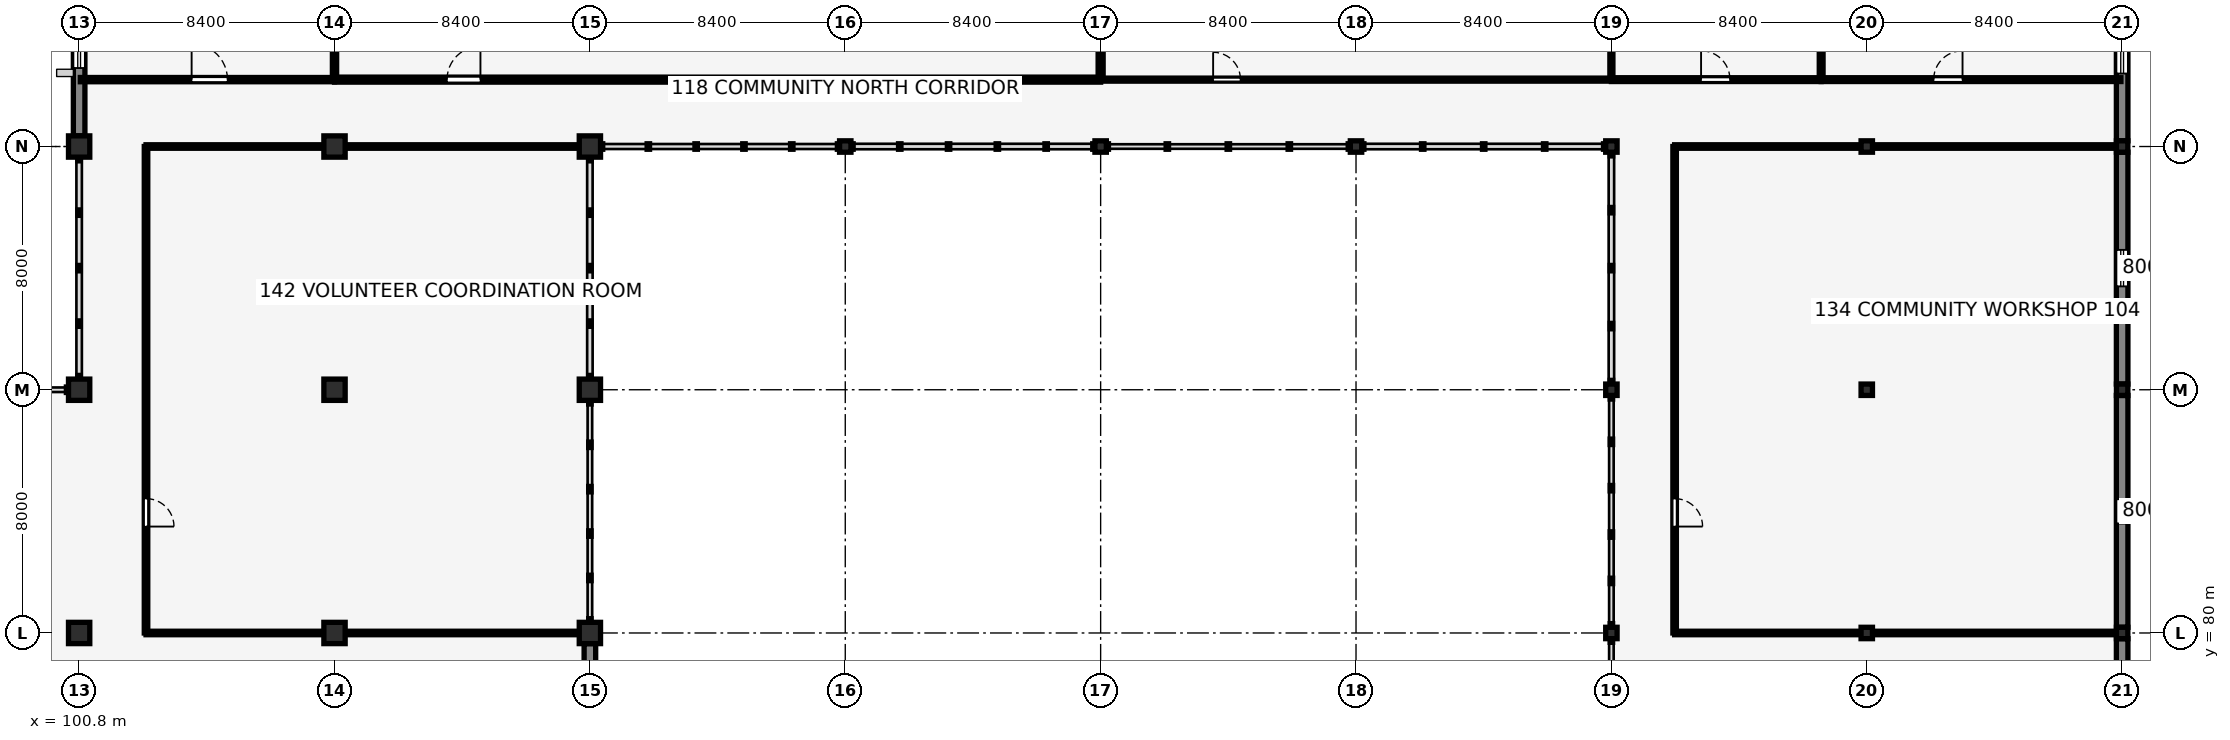
"""IFC4 building model, lengths in metres.
Left out: names, types, materials, properties, quantities, classifications, styles, units other than length and angle.
Written with IfcOpenShell. Run it as: python <this file> out.ifc"""

import sys

from ifc_helpers import new_model, si_unit, direction, frame, frame_2d, origin, origin_2d, place, context, subcontext, project, spatial, rectangle, i_section, extrude, element, fill, save


model = new_model("IFC4")
c1 = context("Model", 3, precision=1e-05, world=origin(), true_north=direction((0.0, 1.0)))
c2 = subcontext(c1, "Body", "Model", "MODEL_VIEW")
j1 = project(units=[si_unit("LENGTHUNIT", "METRE"), si_unit("PLANEANGLEUNIT", "RADIAN")], contexts=[c1])
p1 = place(None, origin())
s1 = spatial("IfcSite", under=j1, at=p1, CompositionType="ELEMENT")
p2 = place(p1, origin())
s2 = spatial("IfcBuilding", under=s1, at=p2, CompositionType="ELEMENT")
p3 = place(p2, frame((0.0, 0.0, 5.44)))
s3 = spatial("IfcBuildingStorey", under=s2, at=p3, CompositionType="ELEMENT", Elevation=5.44)
for number, where, z_axis, x_axis in (
    (1, (100.8, 80.0, 0.0), (0.0, 0.0, 1.0), (1.0, 0.0, 0.0)),
    (2, (100.8, 88.0, 0.0), (0.0, 0.0, 1.0), (1.0, 0.0, 0.0)),
    (3, (100.8, 96.0, 0.0), (0.0, 0.0, 1.0), (1.0, 0.0, 0.0)),
    (4, (109.2, 80.0, 0.0), (0.0, 0.0, 1.0), (1.0, 0.0, 0.0)),
    (5, (109.2, 88.0, 0.0), (0.0, 0.0, 1.0), (1.0, 0.0, 0.0)),
    (6, (109.2, 96.0, 0.0), (0.0, 0.0, 1.0), (1.0, 0.0, 0.0)),
    (7, (117.6, 80.0, 0.0), (0.0, 0.0, 1.0), (1.0, 0.0, 0.0)),
    (8, (117.6, 88.0, 0.0), (0.0, 0.0, 1.0), (1.0, 0.0, 0.0)),
    (9, (117.6, 96.0, 0.0), (0.0, 0.0, 1.0), (1.0, 0.0, 0.0)),
):
    element("IfcColumn", number, at=place(p3, frame(where, z_axis=z_axis, x_axis=x_axis)), inside=s3, PredefinedType="COLUMN", context=c2, shape_type="SweptSolid", body=[
        extrude(rectangle(XDim=0.7, YDim=0.7, at=origin_2d()), origin(), (0.0, 0.0, 1.0), 3.8),
    ])
for number, where, z_axis, x_axis in (
    (10, (126.0, 96.0, 0.0), (0.0, 0.0, 1.0), (1.0, 0.0, 0.0)),
    (11, (134.4, 96.0, 0.0), (0.0, 0.0, 1.0), (1.0, 0.0, 0.0)),
    (12, (142.8, 96.0, 0.0), (0.0, 0.0, 1.0), (1.0, 0.0, 0.0)),
    (13, (151.2, 80.0, 0.0), (0.0, 0.0, 1.0), (1.0, 0.0, 0.0)),
    (14, (151.2, 88.0, 0.0), (0.0, 0.0, 1.0), (1.0, 0.0, 0.0)),
    (15, (151.2, 96.0, 0.0), (0.0, 0.0, 1.0), (1.0, 0.0, 0.0)),
    (16, (159.6, 80.0, 0.0), (0.0, 0.0, 1.0), (1.0, 0.0, 0.0)),
    (17, (159.6, 88.0, 0.0), (0.0, 0.0, 1.0), (1.0, 0.0, 0.0)),
    (18, (159.6, 96.0, 0.0), (0.0, 0.0, 1.0), (1.0, 0.0, 0.0)),
    (19, (168.0, 80.0, 0.0), (0.0, 0.0, 1.0), (1.0, 0.0, 0.0)),
    (20, (168.0, 88.0, 0.0), (0.0, 0.0, 1.0), (1.0, 0.0, 0.0)),
    (21, (168.0, 96.0, 0.0), (0.0, 0.0, 1.0), (1.0, 0.0, 0.0)),
):
    element("IfcColumn", number, at=place(p3, frame(where, z_axis=z_axis, x_axis=x_axis)), inside=s3, PredefinedType="COLUMN", context=c2, shape_type="SweptSolid", body=[
        extrude(i_section(OverallWidth=0.375, OverallDepth=0.375, WebThickness=0.017, FlangeThickness=0.027, FilletRadius=0.015, at=origin_2d()), origin(), (0.0, 0.0, 1.0), 3.8),
    ])
p4 = place(p3, frame((100.8, 96.35, 0.0), z_axis=(0.0, 0.0, 1.0), x_axis=(0.0, 1.0, 0.0)))
e22 = element("IfcWall", 22, at=p4, inside=s3, PredefinedType="SOLIDWALL", context=c2, shape_type="SweptSolid", body=[
    extrude(rectangle(XDim=7.463, YDim=0.38, at=frame_2d((3.731, 0.0))), origin(), (0.0, 0.0, 1.0), 3.442),
])
p5 = place(p4, frame((2.231, 0.0, 0.9), z_axis=(0.0, 0.0, 1.0), x_axis=(1.0, 0.0, 0.0)))
e23 = element("IfcOpeningElement", 23, at=p5, cuts=e22, PredefinedType="OPENING", context=c2, shape_type="SweptSolid", body=[
    extrude(rectangle(XDim=3.0, YDim=1.65, at=frame_2d((1.5, 0.825))), frame((0.0, 0.2, 0.0), z_axis=(0.0, -1.0, 0.0), x_axis=(1.0, 0.0, 0.0)), (0.0, 0.0, 1.0), 0.4),
])
p6 = place(p3, frame((168.0, 96.187, 0.0), z_axis=(0.0, 0.0, 1.0), x_axis=(0.0, 1.0, 0.0)))
e24 = element("IfcWall", 24, at=p6, inside=s3, PredefinedType="SOLIDWALL", context=c2, shape_type="SweptSolid", body=[
    extrude(rectangle(XDim=7.625, YDim=0.38, at=frame_2d((3.813, 0.0))), origin(), (0.0, 0.0, 1.0), 3.442),
])
p7 = place(p6, frame((2.213, 0.0, 1.55), z_axis=(0.0, 0.0, 1.0), x_axis=(1.0, 0.0, 0.0)))
e25 = element("IfcOpeningElement", 25, at=p7, cuts=e24, PredefinedType="OPENING", context=c2, shape_type="SweptSolid", body=[
    extrude(rectangle(XDim=3.2, YDim=0.9, at=frame_2d((1.6, 0.45))), frame((0.0, 0.2, 0.0), z_axis=(0.0, -1.0, 0.0), x_axis=(1.0, 0.0, 0.0)), (0.0, 0.0, 1.0), 0.4),
])
p8 = place(p3, frame((168.0, 72.187, 0.0), z_axis=(0.0, 0.0, 1.0), x_axis=(0.0, 1.0, 0.0)))
e26 = element("IfcWall", 26, at=p8, inside=s3, PredefinedType="SOLIDWALL", context=c2, shape_type="SweptSolid", body=[
    extrude(rectangle(XDim=7.625, YDim=0.38, at=frame_2d((3.813, 0.0))), origin(), (0.0, 0.0, 1.0), 3.5),
])
p9 = place(p3, frame((168.0, 80.187, 0.0), z_axis=(0.0, 0.0, 1.0), x_axis=(0.0, 1.0, 0.0)))
e27 = element("IfcWall", 27, at=p9, inside=s3, PredefinedType="SOLIDWALL", context=c2, shape_type="SweptSolid", body=[
    extrude(rectangle(XDim=7.625, YDim=0.38, at=frame_2d((3.813, 0.0))), origin(), (0.0, 0.0, 1.0), 3.442),
])
p10 = place(p9, frame((3.413, 0.0, 0.65), z_axis=(0.0, 0.0, 1.0), x_axis=(1.0, 0.0, 0.0)))
e28 = element("IfcOpeningElement", 28, at=p10, cuts=e27, PredefinedType="OPENING", context=c2, shape_type="SweptSolid", body=[
    extrude(rectangle(XDim=0.8, YDim=1.85, at=frame_2d((0.4, 0.925))), frame((0.0, 0.2, 0.0), z_axis=(0.0, -1.0, 0.0), x_axis=(1.0, 0.0, 0.0)), (0.0, 0.0, 1.0), 0.4),
])
p11 = place(p3, frame((168.0, 88.187, 0.0), z_axis=(0.0, 0.0, 1.0), x_axis=(0.0, 1.0, 0.0)))
e29 = element("IfcWall", 29, at=p11, inside=s3, PredefinedType="SOLIDWALL", context=c2, shape_type="SweptSolid", body=[
    extrude(rectangle(XDim=7.625, YDim=0.38, at=frame_2d((3.813, 0.0))), origin(), (0.0, 0.0, 1.0), 3.442),
])
p12 = place(p11, frame((3.213, 0.0, 1.55), z_axis=(0.0, 0.0, 1.0), x_axis=(1.0, 0.0, 0.0)))
e30 = element("IfcOpeningElement", 30, at=p12, cuts=e29, PredefinedType="OPENING", context=c2, shape_type="SweptSolid", body=[
    extrude(rectangle(XDim=1.2, YDim=0.95, at=frame_2d((0.6, 0.475))), frame((0.0, 0.2, 0.0), z_axis=(0.0, -1.0, 0.0), x_axis=(1.0, 0.0, 0.0)), (0.0, 0.0, 1.0), 0.4),
])
p13 = place(p3, frame((117.6, 72.35, 0.0), z_axis=(0.0, 0.0, 1.0), x_axis=(0.0, 1.0, 0.0)))
e31 = element("IfcWall", 31, at=p13, inside=s3, PredefinedType="SOLIDWALL", context=c2, shape_type="SweptSolid", body=[
    extrude(rectangle(XDim=7.3, YDim=0.38, at=frame_2d((3.65, 0.0))), origin(), (0.0, 0.0, 1.0), 3.5),
])
p14 = place(p3, frame((100.84, 98.2, 0.0), z_axis=(0.0, 0.0, 1.0), x_axis=(1.0, 0.0, 0.0)))
e32 = element("IfcWall", 32, at=p14, inside=s3, PredefinedType="PARTITIONING", context=c2, shape_type="SweptSolid", body=[
    extrude(rectangle(XDim=8.36, YDim=0.14, at=frame_2d((4.18, 0.0))), origin(), (0.0, 0.0, 1.0), 3.8),
])
p15 = place(p14, frame((3.66, 0.0, 0.0), z_axis=(0.0, 0.0, 1.0), x_axis=(1.0, 0.0, 0.0)))
e33 = element("IfcOpeningElement", 33, at=p15, cuts=e32, PredefinedType="OPENING", context=c2, shape_type="SweptSolid", body=[
    extrude(rectangle(XDim=1.18, YDim=2.22, at=frame_2d((0.59, 1.11))), frame((0.0, 0.08, 0.0), z_axis=(0.0, -1.0, 0.0), x_axis=(1.0, 0.0, 0.0)), (0.0, 0.0, 1.0), 0.16),
])
p16 = place(p3, frame((109.2, 98.2, 0.0), z_axis=(0.0, 0.0, 1.0), x_axis=(1.0, 0.0, 0.0)))
e34 = element("IfcWall", 34, at=p16, inside=s3, PredefinedType="PARTITIONING", context=c2, shape_type="SweptSolid", body=[
    extrude(rectangle(XDim=25.2, YDim=0.165, at=frame_2d((12.6, 0.0))), origin(), (0.0, 0.0, 1.0), 3.8),
])
p17 = place(p16, frame((3.7, 0.0, 0.0), z_axis=(0.0, 0.0, 1.0), x_axis=(1.0, 0.0, 0.0)))
e35 = element("IfcOpeningElement", 35, at=p17, cuts=e34, PredefinedType="OPENING", context=c2, shape_type="SweptSolid", body=[
    extrude(rectangle(XDim=1.1, YDim=2.2, at=frame_2d((0.55, 1.1))), frame((0.0, 0.093, 0.0), z_axis=(0.0, -1.0, 0.0), x_axis=(1.0, 0.0, 0.0)), (0.0, 0.0, 1.0), 0.185),
])
p18 = place(p3, frame((134.4, 98.2, 0.0), z_axis=(0.0, 0.0, 1.0), x_axis=(1.0, 0.0, 0.0)))
e36 = element("IfcWall", 36, at=p18, inside=s3, PredefinedType="PARTITIONING", context=c2, shape_type="SweptSolid", body=[
    extrude(rectangle(XDim=16.8, YDim=0.1, at=frame_2d((8.4, 0.0))), origin(), (0.0, 0.0, 1.0), 3.337),
])
p19 = place(p18, frame((3.7, 0.0, 0.0), z_axis=(0.0, 0.0, 1.0), x_axis=(1.0, 0.0, 0.0)))
e37 = element("IfcOpeningElement", 37, at=p19, cuts=e36, PredefinedType="OPENING", context=c2, shape_type="SweptSolid", body=[
    extrude(rectangle(XDim=0.9, YDim=2.1, at=frame_2d((0.45, 1.05))), frame((0.0, 0.06, 0.0), z_axis=(0.0, -1.0, 0.0), x_axis=(1.0, 0.0, 0.0)), (0.0, 0.0, 1.0), 0.12),
])
p20 = place(p3, frame((151.2, 98.2, 0.0), z_axis=(0.0, 0.0, 1.0), x_axis=(1.0, 0.0, 0.0)))
e38 = element("IfcWall", 38, at=p20, inside=s3, PredefinedType="PARTITIONING", context=c2, shape_type="SweptSolid", body=[
    extrude(rectangle(XDim=6.9, YDim=0.125, at=frame_2d((3.45, 0.0))), origin(), (0.0, 0.0, 1.0), 3.8),
])
p21 = place(p20, frame((2.95, 0.0, 0.0), z_axis=(0.0, 0.0, 1.0), x_axis=(1.0, 0.0, 0.0)))
e39 = element("IfcOpeningElement", 39, at=p21, cuts=e38, PredefinedType="OPENING", context=c2, shape_type="SweptSolid", body=[
    extrude(rectangle(XDim=0.95, YDim=2.15, at=frame_2d((0.475, 1.075))), frame((0.0, 0.073, 0.0), z_axis=(0.0, -1.0, 0.0), x_axis=(1.0, 0.0, 0.0)), (0.0, 0.0, 1.0), 0.145),
])
p22 = place(p3, frame((158.1, 98.2, 0.0), z_axis=(0.0, 0.0, 1.0), x_axis=(1.0, 0.0, 0.0)))
e40 = element("IfcWall", 40, at=p22, inside=s3, PredefinedType="PARTITIONING", context=c2, shape_type="SweptSolid", body=[
    extrude(rectangle(XDim=9.86, YDim=0.125, at=frame_2d((4.93, 0.0))), origin(), (0.0, 0.0, 1.0), 3.337),
])
p23 = place(p22, frame((3.7, 0.0, 0.0), z_axis=(0.0, 0.0, 1.0), x_axis=(1.0, 0.0, 0.0)))
e41 = element("IfcOpeningElement", 41, at=p23, cuts=e40, PredefinedType="OPENING", context=c2, shape_type="SweptSolid", body=[
    extrude(rectangle(XDim=0.95, YDim=2.15, at=frame_2d((0.475, 1.075))), frame((0.0, 0.073, 0.0), z_axis=(0.0, -1.0, 0.0), x_axis=(1.0, 0.0, 0.0)), (0.0, 0.0, 1.0), 0.145),
])
p24 = place(p3, frame((103.0, 80.0, 0.0), z_axis=(0.0, 0.0, 1.0), x_axis=(0.0, 1.0, 0.0)))
e42 = element("IfcWall", 42, at=p24, inside=s3, PredefinedType="PARTITIONING", context=c2, shape_type="SweptSolid", body=[
    extrude(rectangle(XDim=16.0, YDim=0.115, at=frame_2d((8.0, 0.0))), origin(), (0.0, 0.0, 1.0), 3.8),
])
p25 = place(p24, frame((4.42, 0.0, 0.0), z_axis=(0.0, 0.0, 1.0), x_axis=(-1.0, 0.0, 0.0)))
e43 = element("IfcOpeningElement", 43, at=p25, cuts=e42, PredefinedType="OPENING", context=c2, shape_type="SweptSolid", body=[
    extrude(rectangle(XDim=0.92, YDim=2.12, at=frame_2d((0.46, 1.06))), frame((0.0, 0.067, 0.0), z_axis=(0.0, -1.0, 0.0), x_axis=(1.0, 0.0, 0.0)), (0.0, 0.0, 1.0), 0.135),
])
p26 = place(p3, frame((153.28, 80.0, 0.0), z_axis=(0.0, 0.0, 1.0), x_axis=(0.0, 1.0, 0.0)))
e44 = element("IfcWall", 44, at=p26, inside=s3, PredefinedType="PARTITIONING", context=c2, shape_type="SweptSolid", body=[
    extrude(rectangle(XDim=16.0, YDim=0.115, at=frame_2d((8.0, 0.0))), origin(), (0.0, 0.0, 1.0), 3.8),
])
p27 = place(p26, frame((4.42, 0.0, 0.0), z_axis=(0.0, 0.0, 1.0), x_axis=(-1.0, 0.0, 0.0)))
e45 = element("IfcOpeningElement", 45, at=p27, cuts=e44, PredefinedType="OPENING", context=c2, shape_type="SweptSolid", body=[
    extrude(rectangle(XDim=0.92, YDim=2.12, at=frame_2d((0.46, 1.06))), frame((0.0, 0.067, 0.0), z_axis=(0.0, -1.0, 0.0), x_axis=(1.0, 0.0, 0.0)), (0.0, 0.0, 1.0), 0.135),
])
p28 = place(p3, frame((109.2, 98.2, 0.0), z_axis=(0.0, 0.0, 1.0), x_axis=(0.0, 1.0, 0.0)))
e46 = element("IfcWall", 46, at=p28, inside=s3, PredefinedType="PARTITIONING", context=c2, shape_type="SweptSolid", body=[
    extrude(rectangle(XDim=5.623, YDim=0.14, at=frame_2d((2.812, 0.0))), origin(), (0.0, 0.0, 1.0), 3.337),
])
p29 = place(p3, frame((134.4, 98.2, 0.0), z_axis=(0.0, 0.0, 1.0), x_axis=(0.0, 1.0, 0.0)))
e47 = element("IfcWall", 47, at=p29, inside=s3, PredefinedType="PARTITIONING", context=c2, shape_type="SweptSolid", body=[
    extrude(rectangle(XDim=5.623, YDim=0.165, at=frame_2d((2.812, 0.0))), origin(), (0.0, 0.0, 1.0), 3.337),
])
p30 = place(p3, frame((151.2, 98.2, 0.0), z_axis=(0.0, 0.0, 1.0), x_axis=(0.0, 1.0, 0.0)))
e48 = element("IfcWall", 48, at=p30, inside=s3, PredefinedType="PARTITIONING", context=c2, shape_type="SweptSolid", body=[
    extrude(rectangle(XDim=5.623, YDim=0.1, at=frame_2d((2.812, 0.0))), origin(), (0.0, 0.0, 1.0), 3.337),
])
p31 = place(p3, frame((158.1, 98.2, 0.0), z_axis=(0.0, 0.0, 1.0), x_axis=(0.0, 1.0, 0.0)))
e49 = element("IfcWall", 49, at=p31, inside=s3, PredefinedType="PARTITIONING", context=c2, shape_type="SweptSolid", body=[
    extrude(rectangle(XDim=13.76, YDim=0.125, at=frame_2d((6.88, 0.0))), origin(), (0.0, 0.0, 1.0), 3.8),
])
p32 = place(p3, frame((103.0, 80.0, 0.0), z_axis=(0.0, 0.0, 1.0), x_axis=(1.0, 0.0, 0.0)))
e50 = element("IfcWall", 50, at=p32, inside=s3, PredefinedType="PARTITIONING", context=c2, shape_type="SweptSolid", body=[
    extrude(rectangle(XDim=5.86, YDim=0.115, at=frame_2d((2.93, 0.0))), origin(), (0.0, 0.0, 1.0), 3.26),
])
p33 = place(p3, frame((109.54, 80.0, 0.0), z_axis=(0.0, 0.0, 1.0), x_axis=(1.0, 0.0, 0.0)))
e51 = element("IfcWall", 51, at=p33, inside=s3, PredefinedType="PARTITIONING", context=c2, shape_type="SweptSolid", body=[
    extrude(rectangle(XDim=7.72, YDim=0.115, at=frame_2d((3.86, 0.0))), origin(), (0.0, 0.0, 1.0), 3.26),
])
p34 = place(p3, frame((103.0, 96.0, 0.0), z_axis=(0.0, 0.0, 1.0), x_axis=(1.0, 0.0, 0.0)))
e52 = element("IfcWall", 52, at=p34, inside=s3, PredefinedType="PARTITIONING", context=c2, shape_type="SweptSolid", body=[
    extrude(rectangle(XDim=5.86, YDim=0.115, at=frame_2d((2.93, 0.0))), origin(), (0.0, 0.0, 1.0), 3.26),
])
p35 = place(p3, frame((109.54, 96.0, 0.0), z_axis=(0.0, 0.0, 1.0), x_axis=(1.0, 0.0, 0.0)))
e53 = element("IfcWall", 53, at=p35, inside=s3, PredefinedType="PARTITIONING", context=c2, shape_type="SweptSolid", body=[
    extrude(rectangle(XDim=7.72, YDim=0.115, at=frame_2d((3.86, 0.0))), origin(), (0.0, 0.0, 1.0), 3.26),
])
p36 = place(p3, frame((153.28, 80.0, 0.0), z_axis=(0.0, 0.0, 1.0), x_axis=(1.0, 0.0, 0.0)))
e54 = element("IfcWall", 54, at=p36, inside=s3, PredefinedType="PARTITIONING", context=c2, shape_type="SweptSolid", body=[
    extrude(rectangle(XDim=6.143, YDim=0.115, at=frame_2d((3.071, 0.0))), origin(), (0.0, 0.0, 1.0), 3.26),
])
p37 = place(p3, frame((159.777, 80.0, 0.0), z_axis=(0.0, 0.0, 1.0), x_axis=(1.0, 0.0, 0.0)))
e55 = element("IfcWall", 55, at=p37, inside=s3, PredefinedType="PARTITIONING", context=c2, shape_type="SweptSolid", body=[
    extrude(rectangle(XDim=8.045, YDim=0.115, at=frame_2d((4.023, 0.0))), origin(), (0.0, 0.0, 1.0), 3.26),
])
p38 = place(p3, frame((153.28, 96.0, 0.0), z_axis=(0.0, 0.0, 1.0), x_axis=(1.0, 0.0, 0.0)))
e56 = element("IfcWall", 56, at=p38, inside=s3, PredefinedType="PARTITIONING", context=c2, shape_type="SweptSolid", body=[
    extrude(rectangle(XDim=6.143, YDim=0.115, at=frame_2d((3.071, 0.0))), origin(), (0.0, 0.0, 1.0), 3.26),
])
p39 = place(p3, frame((159.777, 96.0, 0.0), z_axis=(0.0, 0.0, 1.0), x_axis=(1.0, 0.0, 0.0)))
e57 = element("IfcWall", 57, at=p39, inside=s3, PredefinedType="PARTITIONING", context=c2, shape_type="SweptSolid", body=[
    extrude(rectangle(XDim=8.045, YDim=0.115, at=frame_2d((4.023, 0.0))), origin(), (0.0, 0.0, 1.0), 3.26),
])
p40 = place(p5, origin())
e58 = element("IfcWindow", 58, at=p40, inside=s3, PartitioningType="DOUBLE_PANEL_VERTICAL", PredefinedType="WINDOW", context=c2, shape_type="SweptSolid", body=[
    extrude(rectangle(XDim=3.0, YDim=1.65, at=frame_2d((1.5, 0.825))), frame((0.0, 0.03, 0.0), z_axis=(0.0, -1.0, 0.0), x_axis=(1.0, 0.0, 0.0)), (0.0, 0.0, 1.0), 0.06),
])
fill(e23, e58)
p41 = place(p7, origin())
e59 = element("IfcWindow", 59, at=p41, inside=s3, PartitioningType="TRIPLE_PANEL_HORIZONTAL", PredefinedType="WINDOW", context=c2, shape_type="SweptSolid", body=[
    extrude(rectangle(XDim=3.2, YDim=0.9, at=frame_2d((1.6, 0.45))), frame((0.0, 0.03, 0.0), z_axis=(0.0, -1.0, 0.0), x_axis=(1.0, 0.0, 0.0)), (0.0, 0.0, 1.0), 0.06),
])
fill(e25, e59)
p42 = place(p10, origin())
e60 = element("IfcWindow", 60, at=p42, inside=s3, PartitioningType="SINGLE_PANEL", PredefinedType="WINDOW", context=c2, shape_type="SweptSolid", body=[
    extrude(rectangle(XDim=0.8, YDim=1.85, at=frame_2d((0.4, 0.925))), frame((0.0, 0.03, 0.0), z_axis=(0.0, -1.0, 0.0), x_axis=(1.0, 0.0, 0.0)), (0.0, 0.0, 1.0), 0.06),
])
fill(e28, e60)
p43 = place(p12, origin())
e61 = element("IfcWindow", 61, at=p43, inside=s3, PartitioningType="SINGLE_PANEL", PredefinedType="WINDOW", context=c2, shape_type="SweptSolid", body=[
    extrude(rectangle(XDim=1.2, YDim=0.95, at=frame_2d((0.6, 0.475))), frame((0.0, 0.03, 0.0), z_axis=(0.0, -1.0, 0.0), x_axis=(1.0, 0.0, 0.0)), (0.0, 0.0, 1.0), 0.06),
])
fill(e30, e61)
p44 = place(p15, origin())
e62 = element("IfcDoor", 62, at=p44, inside=s3, OperationType="SINGLE_SWING_LEFT", PredefinedType="DOOR", context=c2, shape_type="SweptSolid", body=[
    extrude(rectangle(XDim=1.18, YDim=2.22, at=frame_2d((0.59, 1.11))), frame((0.0, 0.025, 0.0), z_axis=(0.0, -1.0, 0.0), x_axis=(1.0, 0.0, 0.0)), (0.0, 0.0, 1.0), 0.05),
])
fill(e33, e62)
p45 = place(p17, origin())
e63 = element("IfcDoor", 63, at=p45, inside=s3, OperationType="SINGLE_SWING_RIGHT", PredefinedType="DOOR", context=c2, shape_type="SweptSolid", body=[
    extrude(rectangle(XDim=1.1, YDim=2.2, at=frame_2d((0.55, 1.1))), frame((0.0, 0.025, 0.0), z_axis=(0.0, -1.0, 0.0), x_axis=(1.0, 0.0, 0.0)), (0.0, 0.0, 1.0), 0.05),
])
fill(e35, e63)
p46 = place(p19, origin())
e64 = element("IfcDoor", 64, at=p46, inside=s3, OperationType="SINGLE_SWING_LEFT", PredefinedType="DOOR", context=c2, shape_type="SweptSolid", body=[
    extrude(rectangle(XDim=0.9, YDim=2.1, at=frame_2d((0.45, 1.05))), frame((0.0, 0.025, 0.0), z_axis=(0.0, -1.0, 0.0), x_axis=(1.0, 0.0, 0.0)), (0.0, 0.0, 1.0), 0.05),
])
fill(e37, e64)
p47 = place(p21, origin())
e65 = element("IfcDoor", 65, at=p47, inside=s3, OperationType="SINGLE_SWING_LEFT", PredefinedType="DOOR", context=c2, shape_type="SweptSolid", body=[
    extrude(rectangle(XDim=0.95, YDim=2.15, at=frame_2d((0.475, 1.075))), frame((0.0, 0.025, 0.0), z_axis=(0.0, -1.0, 0.0), x_axis=(1.0, 0.0, 0.0)), (0.0, 0.0, 1.0), 0.05),
])
fill(e39, e65)
p48 = place(p23, origin())
e66 = element("IfcDoor", 66, at=p48, inside=s3, OperationType="SINGLE_SWING_RIGHT", PredefinedType="DOOR", context=c2, shape_type="SweptSolid", body=[
    extrude(rectangle(XDim=0.95, YDim=2.15, at=frame_2d((0.475, 1.075))), frame((0.0, 0.025, 0.0), z_axis=(0.0, -1.0, 0.0), x_axis=(1.0, 0.0, 0.0)), (0.0, 0.0, 1.0), 0.05),
])
fill(e41, e66)
p49 = place(p25, origin())
e67 = element("IfcDoor", 67, at=p49, inside=s3, OperationType="SINGLE_SWING_RIGHT", PredefinedType="DOOR", context=c2, shape_type="SweptSolid", body=[
    extrude(rectangle(XDim=0.92, YDim=2.12, at=frame_2d((0.46, 1.06))), frame((0.0, 0.025, 0.0), z_axis=(0.0, -1.0, 0.0), x_axis=(1.0, 0.0, 0.0)), (0.0, 0.0, 1.0), 0.05),
])
fill(e43, e67)
p50 = place(p27, origin())
e68 = element("IfcDoor", 68, at=p50, inside=s3, OperationType="SINGLE_SWING_RIGHT", PredefinedType="DOOR", context=c2, shape_type="SweptSolid", body=[
    extrude(rectangle(XDim=0.92, YDim=2.12, at=frame_2d((0.46, 1.06))), frame((0.0, 0.025, 0.0), z_axis=(0.0, -1.0, 0.0), x_axis=(1.0, 0.0, 0.0)), (0.0, 0.0, 1.0), 0.05),
])
fill(e45, e68)
save(model, sys.argv[1])
